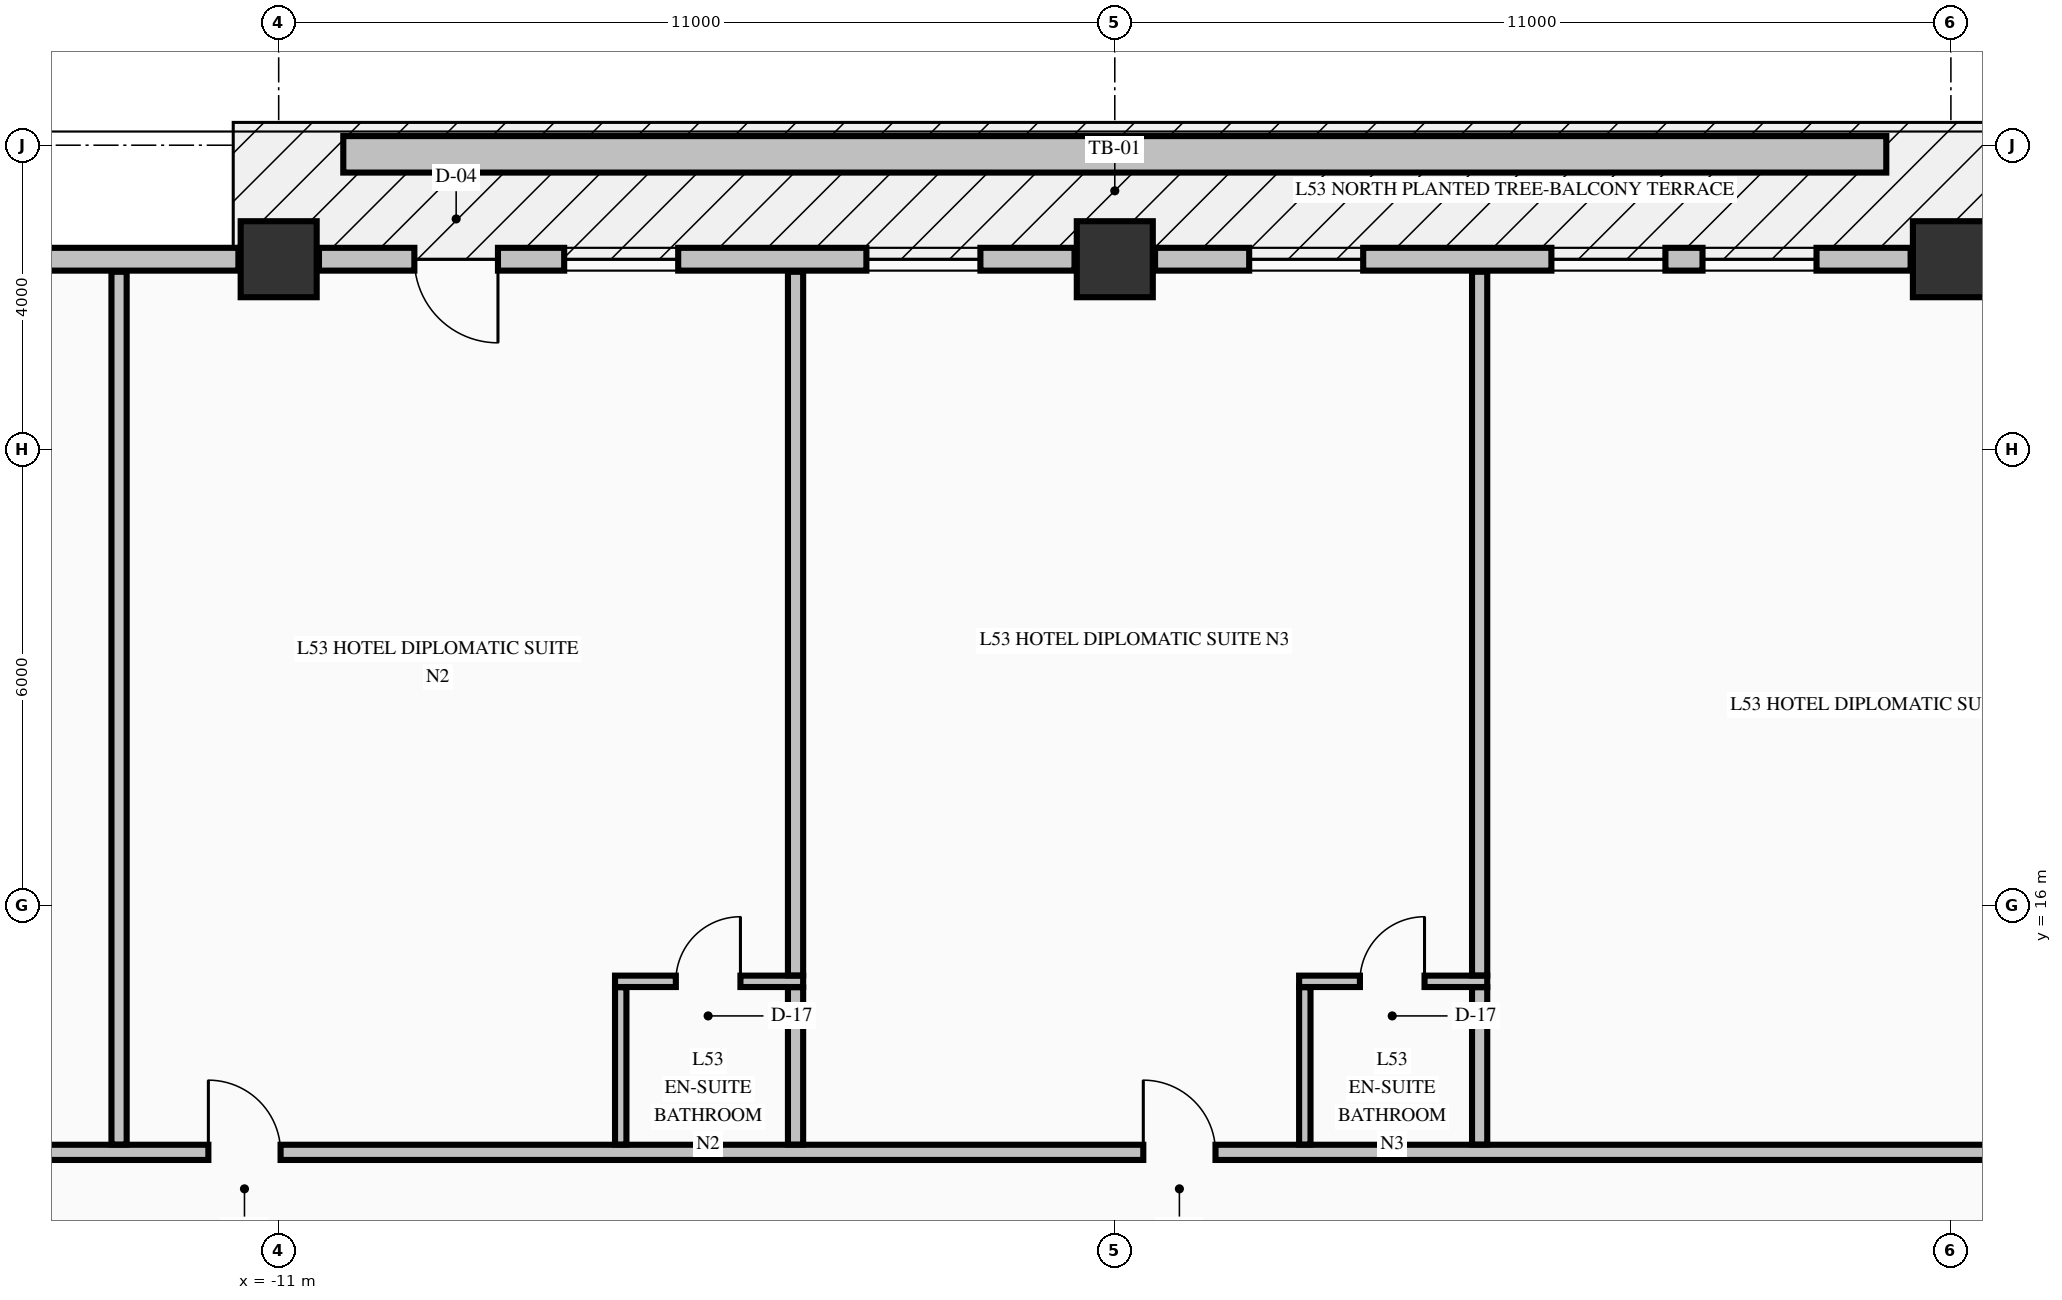
"""IFC4 building model, lengths in metres.
Left out: names, types, materials, properties, quantities, classifications, styles, units other than length and angle.
Written with IfcOpenShell. Run it as: python <this file> out.ifc"""

import sys

from ifc_helpers import new_model, si_unit, direction, frame, frame_2d, origin, origin_2d, place, context, subcontext, project, spatial, rectangle, extrude, element, fill, save


model = new_model("IFC4")
c1 = context("Model", 3, precision=1e-05, world=origin(), true_north=direction((0.0, 1.0)))
c2 = subcontext(c1, "Body", "Model", "MODEL_VIEW")
j1 = project(units=[si_unit("LENGTHUNIT", "METRE"), si_unit("PLANEANGLEUNIT", "RADIAN")], contexts=[c1])
p1 = place(None, origin())
s1 = spatial("IfcSite", under=j1, at=p1, CompositionType="ELEMENT")
p2 = place(p1, origin())
s2 = spatial("IfcBuilding", under=s1, at=p2, CompositionType="ELEMENT")
p3 = place(p2, frame((0.0, 0.0, 205.06)))
s3 = spatial("IfcBuildingStorey", under=s2, at=p3, CompositionType="ELEMENT", Elevation=205.06)
for number, where, z_axis, x_axis in (
    (1, (-11.0, 24.5, -0.25), (0.0, 0.0, 1.0), (1.0, 0.0, 0.0)),
    (2, (0.0, 24.5, -0.25), (0.0, 0.0, 1.0), (1.0, 0.0, 0.0)),
    (3, (11.0, 24.5, -0.25), (0.0, 0.0, 1.0), (1.0, 0.0, 0.0)),
):
    element("IfcColumn", number, at=place(p3, frame(where, z_axis=z_axis, x_axis=x_axis)), inside=s3, PredefinedType="COLUMN", context=c2, shape_type="SweptSolid", body=[
        extrude(rectangle(XDim=1.0, YDim=1.0, at=origin_2d()), origin(), (0.0, 0.0, 1.0), 3.4),
    ])
p4 = place(p3, frame((-11.53, 24.5, 0.0), z_axis=(0.0, 0.0, 1.0), x_axis=(-1.0, 0.0, 0.0)))
e4 = element("IfcWall", 4, at=p4, inside=s3, PredefinedType="STANDARD", context=c2, shape_type="SweptSolid", body=[
    extrude(rectangle(XDim=9.94, YDim=0.3, at=frame_2d((4.97, 0.0))), origin(), (0.0, 0.0, 1.0), 2.542),
])
p5 = place(p4, frame((3.226, 0.0, 0.72)))
e5 = element("IfcOpeningElement", 5, at=p5, cuts=e4, PredefinedType="OPENING", context=c2, shape_type="SweptSolid", body=[
    extrude(rectangle(XDim=1.5, YDim=1.6, at=frame_2d((0.75, 0.8))), frame((0.0, 0.16, 0.0), z_axis=(0.0, -1.0, 0.0), x_axis=(1.0, 0.0, 0.0)), (0.0, 0.0, 1.0), 0.32),
])
p6 = place(p4, frame((5.214, 0.0, 0.72)))
e6 = element("IfcOpeningElement", 6, at=p6, cuts=e4, PredefinedType="OPENING", context=c2, shape_type="SweptSolid", body=[
    extrude(rectangle(XDim=1.5, YDim=1.6, at=frame_2d((0.75, 0.8))), frame((0.0, 0.16, 0.0), z_axis=(0.0, -1.0, 0.0), x_axis=(1.0, 0.0, 0.0)), (0.0, 0.0, 1.0), 0.32),
])
p7 = place(p3, frame((-0.53, 24.5, 0.0), z_axis=(0.0, 0.0, 1.0), x_axis=(-1.0, 0.0, 0.0)))
e7 = element("IfcWall", 7, at=p7, inside=s3, PredefinedType="STANDARD", context=c2, shape_type="SweptSolid", body=[
    extrude(rectangle(XDim=9.94, YDim=0.3, at=frame_2d((4.97, 0.0))), origin(), (0.0, 0.0, 1.0), 2.542),
])
p8 = place(p7, frame((7.585, 0.0, 0.0)))
e8 = element("IfcOpeningElement", 8, at=p8, cuts=e7, PredefinedType="OPENING", context=c2, shape_type="SweptSolid", body=[
    extrude(rectangle(XDim=1.1, YDim=2.15, at=frame_2d((0.55, 1.075))), frame((0.0, 0.16, 0.0), z_axis=(0.0, -1.0, 0.0), x_axis=(1.0, 0.0, 0.0)), (0.0, 0.0, 1.0), 0.32),
])
p9 = place(p7, frame((1.238, 0.0, 0.72)))
e9 = element("IfcOpeningElement", 9, at=p9, cuts=e7, PredefinedType="OPENING", context=c2, shape_type="SweptSolid", body=[
    extrude(rectangle(XDim=1.5, YDim=1.6, at=frame_2d((0.75, 0.8))), frame((0.0, 0.16, 0.0), z_axis=(0.0, -1.0, 0.0), x_axis=(1.0, 0.0, 0.0)), (0.0, 0.0, 1.0), 0.32),
])
p10 = place(p7, frame((5.214, 0.0, 0.72)))
e10 = element("IfcOpeningElement", 10, at=p10, cuts=e7, PredefinedType="OPENING", context=c2, shape_type="SweptSolid", body=[
    extrude(rectangle(XDim=1.5, YDim=1.6, at=frame_2d((0.75, 0.8))), frame((0.0, 0.16, 0.0), z_axis=(0.0, -1.0, 0.0), x_axis=(1.0, 0.0, 0.0)), (0.0, 0.0, 1.0), 0.32),
])
p11 = place(p3, frame((10.47, 24.5, 0.0), z_axis=(0.0, 0.0, 1.0), x_axis=(-1.0, 0.0, 0.0)))
e11 = element("IfcWall", 11, at=p11, inside=s3, PredefinedType="STANDARD", context=c2, shape_type="SweptSolid", body=[
    extrude(rectangle(XDim=9.94, YDim=0.3, at=frame_2d((4.97, 0.0))), origin(), (0.0, 0.0, 1.0), 2.542),
])
p12 = place(p11, frame((1.238, 0.0, 0.72)))
e12 = element("IfcOpeningElement", 12, at=p12, cuts=e11, PredefinedType="OPENING", context=c2, shape_type="SweptSolid", body=[
    extrude(rectangle(XDim=1.5, YDim=1.6, at=frame_2d((0.75, 0.8))), frame((0.0, 0.16, 0.0), z_axis=(0.0, -1.0, 0.0), x_axis=(1.0, 0.0, 0.0)), (0.0, 0.0, 1.0), 0.32),
])
p13 = place(p11, frame((3.226, 0.0, 0.72)))
e13 = element("IfcOpeningElement", 13, at=p13, cuts=e11, PredefinedType="OPENING", context=c2, shape_type="SweptSolid", body=[
    extrude(rectangle(XDim=1.5, YDim=1.6, at=frame_2d((0.75, 0.8))), frame((0.0, 0.16, 0.0), z_axis=(0.0, -1.0, 0.0), x_axis=(1.0, 0.0, 0.0)), (0.0, 0.0, 1.0), 0.32),
])
p14 = place(p11, frame((7.202, 0.0, 0.72)))
e14 = element("IfcOpeningElement", 14, at=p14, cuts=e11, PredefinedType="OPENING", context=c2, shape_type="SweptSolid", body=[
    extrude(rectangle(XDim=1.5, YDim=1.6, at=frame_2d((0.75, 0.8))), frame((0.0, 0.16, 0.0), z_axis=(0.0, -1.0, 0.0), x_axis=(1.0, 0.0, 0.0)), (0.0, 0.0, 1.0), 0.32),
])
p15 = place(p3, frame((-22.1, 12.75, 0.0), z_axis=(0.0, 0.0, 1.0), x_axis=(1.0, 0.0, 0.0)))
e15 = element("IfcWall", 15, at=p15, inside=s3, PredefinedType="PARTITIONING", context=c2, shape_type="SweptSolid", body=[
    extrude(rectangle(XDim=39.2, YDim=0.2, at=frame_2d((19.6, 0.0))), origin(), (0.0, 0.0, 1.0), 3.15),
])
p16 = place(p15, frame((5.125, 0.0, 0.0)))
e16 = element("IfcOpeningElement", 16, at=p16, cuts=e15, PredefinedType="OPENING", context=c2, shape_type="SweptSolid", body=[
    extrude(rectangle(XDim=1.05, YDim=2.15, at=frame_2d((0.525, 1.075))), frame((0.0, 0.11, 0.0), z_axis=(0.0, -1.0, 0.0), x_axis=(1.0, 0.0, 0.0)), (0.0, 0.0, 1.0), 0.22),
])
p17 = place(p15, frame((10.175, 0.0, 0.0)))
e17 = element("IfcOpeningElement", 17, at=p17, cuts=e15, PredefinedType="OPENING", context=c2, shape_type="SweptSolid", body=[
    extrude(rectangle(XDim=0.95, YDim=2.15, at=frame_2d((0.475, 1.075))), frame((0.0, 0.11, 0.0), z_axis=(0.0, -1.0, 0.0), x_axis=(1.0, 0.0, 0.0)), (0.0, 0.0, 1.0), 0.22),
])
p18 = place(p15, frame((22.475, 0.0, 0.0)))
e18 = element("IfcOpeningElement", 18, at=p18, cuts=e15, PredefinedType="OPENING", context=c2, shape_type="SweptSolid", body=[
    extrude(rectangle(XDim=0.95, YDim=2.15, at=frame_2d((0.475, 1.075))), frame((0.0, 0.11, 0.0), z_axis=(0.0, -1.0, 0.0), x_axis=(1.0, 0.0, 0.0)), (0.0, 0.0, 1.0), 0.22),
])
p19 = place(p15, frame((34.675, 0.0, 0.0)))
e19 = element("IfcOpeningElement", 19, at=p19, cuts=e15, PredefinedType="OPENING", context=c2, shape_type="SweptSolid", body=[
    extrude(rectangle(XDim=0.95, YDim=2.15, at=frame_2d((0.475, 1.075))), frame((0.0, 0.11, 0.0), z_axis=(0.0, -1.0, 0.0), x_axis=(1.0, 0.0, 0.0)), (0.0, 0.0, 1.0), 0.22),
])
p20 = place(p3, frame((-6.575, 15.0, 0.0), z_axis=(0.0, 0.0, 1.0), x_axis=(1.0, 0.0, 0.0)))
e20 = element("IfcWall", 20, at=p20, inside=s3, PredefinedType="PARTITIONING", context=c2, shape_type="SweptSolid", body=[
    extrude(rectangle(XDim=2.475, YDim=0.15, at=frame_2d((1.237, 0.0))), origin(), (0.0, 0.0, 1.0), 3.15),
])
p21 = place(p20, frame((0.8, 0.0, 0.0)))
e21 = element("IfcOpeningElement", 21, at=p21, cuts=e20, PredefinedType="OPENING", context=c2, shape_type="SweptSolid", body=[
    extrude(rectangle(XDim=0.85, YDim=2.1, at=frame_2d((0.425, 1.05))), frame((0.0, 0.085, 0.0), z_axis=(0.0, -1.0, 0.0), x_axis=(1.0, 0.0, 0.0)), (0.0, 0.0, 1.0), 0.17),
])
p22 = place(p3, frame((2.425, 15.0, 0.0), z_axis=(0.0, 0.0, 1.0), x_axis=(1.0, 0.0, 0.0)))
e22 = element("IfcWall", 22, at=p22, inside=s3, PredefinedType="PARTITIONING", context=c2, shape_type="SweptSolid", body=[
    extrude(rectangle(XDim=2.475, YDim=0.15, at=frame_2d((1.237, 0.0))), origin(), (0.0, 0.0, 1.0), 3.15),
])
p23 = place(p22, frame((0.8, 0.0, 0.0)))
e23 = element("IfcOpeningElement", 23, at=p23, cuts=e22, PredefinedType="OPENING", context=c2, shape_type="SweptSolid", body=[
    extrude(rectangle(XDim=0.85, YDim=2.1, at=frame_2d((0.425, 1.05))), frame((0.0, 0.085, 0.0), z_axis=(0.0, -1.0, 0.0), x_axis=(1.0, 0.0, 0.0)), (0.0, 0.0, 1.0), 0.17),
])
p24 = place(p3, frame((-13.1, 12.853, 0.0), z_axis=(0.0, 0.0, 1.0), x_axis=(0.0, 1.0, 0.0)))
e24 = element("IfcWall", 24, at=p24, inside=s3, PredefinedType="PARTITIONING", context=c2, shape_type="SweptSolid", body=[
    extrude(rectangle(XDim=11.482, YDim=0.2, at=frame_2d((5.741, 0.0))), origin(), (0.0, 0.0, 1.0), 3.15),
])
p25 = place(p3, frame((-6.5, 12.853, 0.0), z_axis=(0.0, 0.0, 1.0), x_axis=(0.0, 1.0, 0.0)))
e25 = element("IfcWall", 25, at=p25, inside=s3, PredefinedType="PARTITIONING", context=c2, shape_type="SweptSolid", body=[
    extrude(rectangle(XDim=2.069, YDim=0.15, at=frame_2d((1.035, 0.0))), origin(), (0.0, 0.0, 1.0), 3.15),
])
p26 = place(p3, frame((-4.2, 12.853, 0.0), z_axis=(0.0, 0.0, 1.0), x_axis=(0.0, 1.0, 0.0)))
e26 = element("IfcWall", 26, at=p26, inside=s3, PredefinedType="PARTITIONING", context=c2, shape_type="SweptSolid", body=[
    extrude(rectangle(XDim=2.069, YDim=0.2, at=frame_2d((1.035, 0.0))), origin(), (0.0, 0.0, 1.0), 3.15),
])
p27 = place(p3, frame((-4.2, 15.078, 0.0), z_axis=(0.0, 0.0, 1.0), x_axis=(0.0, 1.0, 0.0)))
e27 = element("IfcWall", 27, at=p27, inside=s3, PredefinedType="PARTITIONING", context=c2, shape_type="SweptSolid", body=[
    extrude(rectangle(XDim=9.257, YDim=0.2, at=frame_2d((4.628, 0.0))), origin(), (0.0, 0.0, 1.0), 3.15),
])
p28 = place(p3, frame((2.5, 12.853, 0.0), z_axis=(0.0, 0.0, 1.0), x_axis=(0.0, 1.0, 0.0)))
e28 = element("IfcWall", 28, at=p28, inside=s3, PredefinedType="PARTITIONING", context=c2, shape_type="SweptSolid", body=[
    extrude(rectangle(XDim=2.069, YDim=0.15, at=frame_2d((1.035, 0.0))), origin(), (0.0, 0.0, 1.0), 3.15),
])
p29 = place(p3, frame((4.8, 12.853, 0.0), z_axis=(0.0, 0.0, 1.0), x_axis=(0.0, 1.0, 0.0)))
e29 = element("IfcWall", 29, at=p29, inside=s3, PredefinedType="PARTITIONING", context=c2, shape_type="SweptSolid", body=[
    extrude(rectangle(XDim=2.069, YDim=0.2, at=frame_2d((1.035, 0.0))), origin(), (0.0, 0.0, 1.0), 3.15),
])
p30 = place(p3, frame((4.8, 15.078, 0.0), z_axis=(0.0, 0.0, 1.0), x_axis=(0.0, 1.0, 0.0)))
e30 = element("IfcWall", 30, at=p30, inside=s3, PredefinedType="PARTITIONING", context=c2, shape_type="SweptSolid", body=[
    extrude(rectangle(XDim=9.257, YDim=0.2, at=frame_2d((4.628, 0.0))), origin(), (0.0, 0.0, 1.0), 3.15),
])
p31 = place(p3, frame((-10.15, 25.88, -0.04), z_axis=(0.0, 0.0, 1.0), x_axis=(1.0, 0.0, 0.0)))
e31 = element("IfcWall", 31, at=p31, inside=s3, PredefinedType="PARAPET", context=c2, shape_type="SweptSolid", body=[
    extrude(rectangle(XDim=20.3, YDim=0.48, at=frame_2d((10.15, 0.0))), origin(), (0.0, 0.0, 1.0), 0.52),
])
p32 = place(p8, origin())
e32 = element("IfcDoor", 32, at=p32, inside=s3, OperationType="SINGLE_SWING_LEFT", PredefinedType="DOOR", context=c2, shape_type="SweptSolid", body=[
    extrude(rectangle(XDim=1.1, YDim=2.15, at=frame_2d((0.55, 1.075))), frame((0.0, 0.025, 0.0), z_axis=(0.0, -1.0, 0.0), x_axis=(1.0, 0.0, 0.0)), (0.0, 0.0, 1.0), 0.05),
])
fill(e8, e32)
p33 = place(p9, origin())
e33 = element("IfcWindow", 33, at=p33, inside=s3, PartitioningType="SINGLE_PANEL", PredefinedType="WINDOW", context=c2, shape_type="SweptSolid", body=[
    extrude(rectangle(XDim=1.5, YDim=1.6, at=frame_2d((0.75, 0.8))), frame((0.0, 0.03, 0.0), z_axis=(0.0, -1.0, 0.0), x_axis=(1.0, 0.0, 0.0)), (0.0, 0.0, 1.0), 0.06),
])
fill(e9, e33)
p34 = place(p10, origin())
e34 = element("IfcWindow", 34, at=p34, inside=s3, PartitioningType="SINGLE_PANEL", PredefinedType="WINDOW", context=c2, shape_type="SweptSolid", body=[
    extrude(rectangle(XDim=1.5, YDim=1.6, at=frame_2d((0.75, 0.8))), frame((0.0, 0.03, 0.0), z_axis=(0.0, -1.0, 0.0), x_axis=(1.0, 0.0, 0.0)), (0.0, 0.0, 1.0), 0.06),
])
fill(e10, e34)
p35 = place(p12, origin())
e35 = element("IfcWindow", 35, at=p35, inside=s3, PartitioningType="SINGLE_PANEL", PredefinedType="WINDOW", context=c2, shape_type="SweptSolid", body=[
    extrude(rectangle(XDim=1.5, YDim=1.6, at=frame_2d((0.75, 0.8))), frame((0.0, 0.03, 0.0), z_axis=(0.0, -1.0, 0.0), x_axis=(1.0, 0.0, 0.0)), (0.0, 0.0, 1.0), 0.06),
])
fill(e12, e35)
p36 = place(p13, origin())
e36 = element("IfcWindow", 36, at=p36, inside=s3, PartitioningType="SINGLE_PANEL", PredefinedType="WINDOW", context=c2, shape_type="SweptSolid", body=[
    extrude(rectangle(XDim=1.5, YDim=1.6, at=frame_2d((0.75, 0.8))), frame((0.0, 0.03, 0.0), z_axis=(0.0, -1.0, 0.0), x_axis=(1.0, 0.0, 0.0)), (0.0, 0.0, 1.0), 0.06),
])
fill(e13, e36)
p37 = place(p14, origin())
e37 = element("IfcWindow", 37, at=p37, inside=s3, PartitioningType="SINGLE_PANEL", PredefinedType="WINDOW", context=c2, shape_type="SweptSolid", body=[
    extrude(rectangle(XDim=1.5, YDim=1.6, at=frame_2d((0.75, 0.8))), frame((0.0, 0.03, 0.0), z_axis=(0.0, -1.0, 0.0), x_axis=(1.0, 0.0, 0.0)), (0.0, 0.0, 1.0), 0.06),
])
fill(e14, e37)
p38 = place(p17, origin())
e38 = element("IfcDoor", 38, at=p38, inside=s3, OperationType="SINGLE_SWING_LEFT", PredefinedType="DOOR", context=c2, shape_type="SweptSolid", body=[
    extrude(rectangle(XDim=0.95, YDim=2.15, at=frame_2d((0.475, 1.075))), frame((0.0, 0.025, 0.0), z_axis=(0.0, -1.0, 0.0), x_axis=(1.0, 0.0, 0.0)), (0.0, 0.0, 1.0), 0.05),
])
fill(e17, e38)
p39 = place(p21, origin())
e39 = element("IfcDoor", 39, at=p39, inside=s3, OperationType="SINGLE_SWING_RIGHT", PredefinedType="DOOR", context=c2, shape_type="SweptSolid", body=[
    extrude(rectangle(XDim=0.85, YDim=2.1, at=frame_2d((0.425, 1.05))), frame((0.0, 0.025, 0.0), z_axis=(0.0, -1.0, 0.0), x_axis=(1.0, 0.0, 0.0)), (0.0, 0.0, 1.0), 0.05),
])
fill(e21, e39)
p40 = place(p18, origin())
e40 = element("IfcDoor", 40, at=p40, inside=s3, OperationType="SINGLE_SWING_LEFT", PredefinedType="DOOR", context=c2, shape_type="SweptSolid", body=[
    extrude(rectangle(XDim=0.95, YDim=2.15, at=frame_2d((0.475, 1.075))), frame((0.0, 0.025, 0.0), z_axis=(0.0, -1.0, 0.0), x_axis=(1.0, 0.0, 0.0)), (0.0, 0.0, 1.0), 0.05),
])
fill(e18, e40)
p41 = place(p23, origin())
e41 = element("IfcDoor", 41, at=p41, inside=s3, OperationType="SINGLE_SWING_RIGHT", PredefinedType="DOOR", context=c2, shape_type="SweptSolid", body=[
    extrude(rectangle(XDim=0.85, YDim=2.1, at=frame_2d((0.425, 1.05))), frame((0.0, 0.025, 0.0), z_axis=(0.0, -1.0, 0.0), x_axis=(1.0, 0.0, 0.0)), (0.0, 0.0, 1.0), 0.05),
])
fill(e23, e41)
save(model, sys.argv[1])
